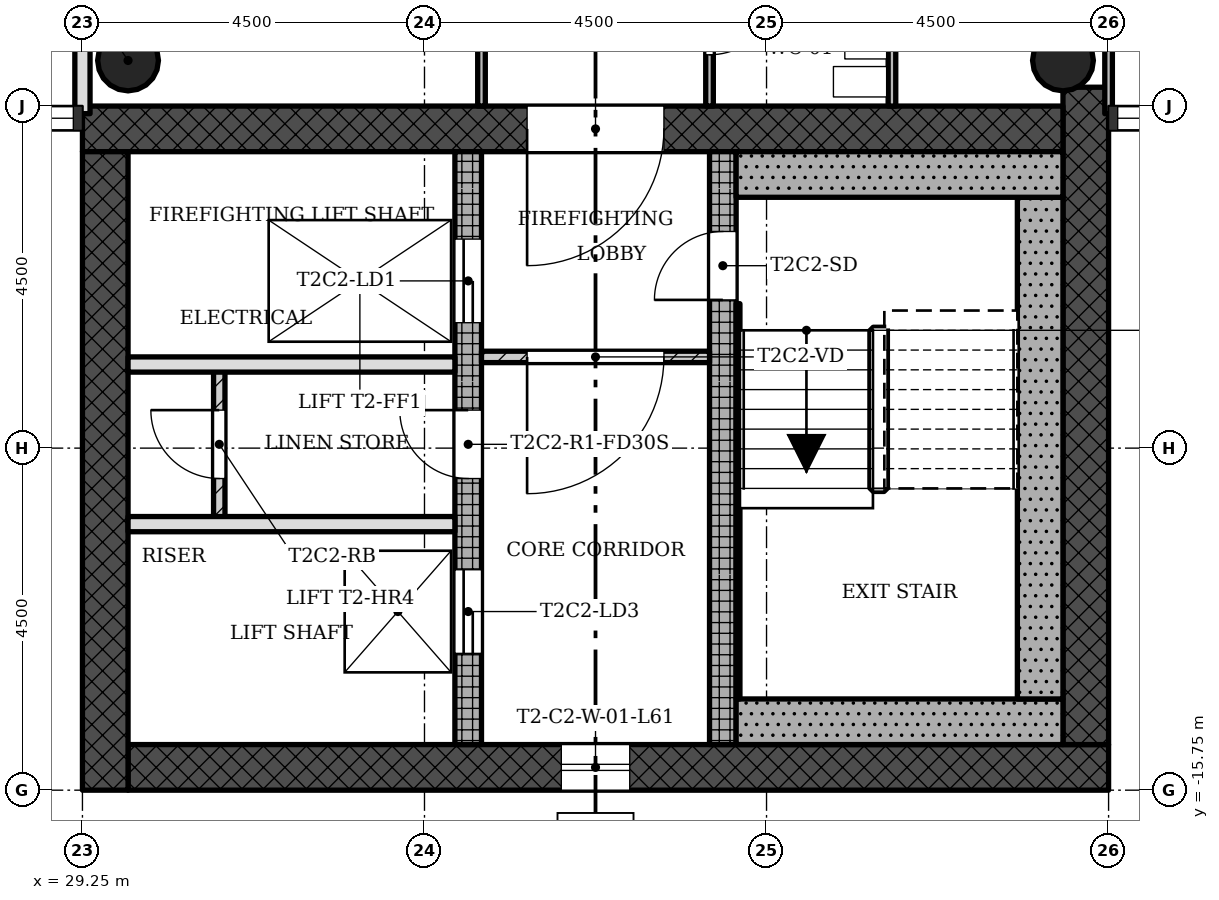
"""IFC4 building model, lengths in metres.
Left out: names, types, materials, properties, quantities, classifications, styles, units other than length and angle.
Written with IfcOpenShell. Run it as: python <this file> out.ifc"""

import sys

from ifc_helpers import new_model, si_unit, direction, frame, frame_2d, origin, origin_2d, place, context, subcontext, project, spatial, rectangle, hollow_circle, extrude, element, fill, save


model = new_model("IFC4")
c1 = context("Model", 3, precision=1e-05, world=origin(), true_north=direction((0.0, 1.0)))
c2 = subcontext(c1, "Body", "Model", "MODEL_VIEW")
j1 = project(units=[si_unit("LENGTHUNIT", "METRE"), si_unit("PLANEANGLEUNIT", "RADIAN")], contexts=[c1])
p1 = place(None, origin())
s1 = spatial("IfcSite", under=j1, at=p1, CompositionType="ELEMENT")
p2 = place(p1, origin())
s2 = spatial("IfcBuilding", under=s1, at=p2, CompositionType="ELEMENT")
p3 = place(p2, frame((0.0, 0.0, 219.8)))
s3 = spatial("IfcBuildingStorey", under=s2, at=p3, CompositionType="ELEMENT", Elevation=219.8)
p4 = place(p3, frame((29.85, -15.45, 0.0), z_axis=(0.0, 0.0, 1.0), x_axis=(1.0, 0.0, 0.0)))
e1 = element("IfcWall", 1, at=p4, inside=s3, PredefinedType="SHEAR", context=c2, shape_type="SweptSolid", body=[
    extrude(rectangle(XDim=12.9, YDim=0.6, at=frame_2d((6.45, 0.0))), origin(), (0.0, 0.0, 1.0), 3.4),
])
p5 = place(p4, frame((5.7, 0.0, 0.45)))
e2 = element("IfcOpeningElement", 2, at=p5, cuts=e1, PredefinedType="OPENING", context=c2, shape_type="SweptSolid", body=[
    extrude(rectangle(XDim=0.9, YDim=2.4, at=frame_2d((0.45, 1.2))), frame((0.0, 0.31, 0.0), z_axis=(0.0, -1.0, 0.0), x_axis=(1.0, 0.0, 0.0)), (0.0, 0.0, 1.0), 0.62),
])
p6 = place(p3, frame((42.45, -15.15, 0.0), z_axis=(0.0, 0.0, 1.0), x_axis=(0.0, 1.0, 0.0)))
e3 = element("IfcWall", 3, at=p6, inside=s3, PredefinedType="SHEAR", context=c2, shape_type="SweptSolid", body=[
    extrude(rectangle(XDim=8.648, YDim=0.6, at=frame_2d((4.324, 0.0))), origin(), (0.0, 0.0, 1.0), 3.4),
])
p7 = place(p3, frame((42.15, -7.05, 0.0), z_axis=(0.0, 0.0, 1.0), x_axis=(-1.0, 0.0, 0.0)))
e4 = element("IfcWall", 4, at=p7, inside=s3, PredefinedType="SHEAR", context=c2, shape_type="SweptSolid", body=[
    extrude(rectangle(XDim=12.9, YDim=0.6, at=frame_2d((6.45, 0.0))), origin(), (0.0, 0.0, 1.0), 3.4),
])
p8 = place(p7, frame((5.25, 0.0, 0.0)))
e5 = element("IfcOpeningElement", 5, at=p8, cuts=e4, PredefinedType="OPENING", context=c2, shape_type="SweptSolid", body=[
    extrude(rectangle(XDim=1.8, YDim=2.1, at=frame_2d((0.9, 1.05))), frame((0.0, 0.31, 0.0), z_axis=(0.0, -1.0, 0.0), x_axis=(1.0, 0.0, 0.0)), (0.0, 0.0, 1.0), 0.62),
])
p9 = place(p3, frame((29.55, -7.35, 0.0), z_axis=(0.0, 0.0, 1.0), x_axis=(0.0, -1.0, 0.0)))
e6 = element("IfcWall", 6, at=p9, inside=s3, PredefinedType="SHEAR", context=c2, shape_type="SweptSolid", body=[
    extrude(rectangle(XDim=8.4, YDim=0.6, at=frame_2d((4.2, 0.0))), origin(), (0.0, 0.0, 1.0), 3.4),
])
p10 = place(p3, frame((34.325, -15.15, 0.0), z_axis=(0.0, 0.0, 1.0), x_axis=(0.0, 1.0, 0.0)))
e7 = element("IfcWall", 7, at=p10, inside=s3, PredefinedType="SHEAR", context=c2, shape_type="SweptSolid", body=[
    extrude(rectangle(XDim=7.8, YDim=0.35, at=frame_2d((3.9, 0.0))), origin(), (0.0, 0.0, 1.0), 3.4),
])
p11 = place(p10, frame((5.55, 0.0, 0.0)))
e8 = element("IfcOpeningElement", 8, at=p11, cuts=e7, PredefinedType="OPENING", context=c2, shape_type="SweptSolid", body=[
    extrude(rectangle(XDim=1.1, YDim=2.1, at=frame_2d((0.55, 1.05))), frame((0.0, 0.185, 0.0), z_axis=(0.0, -1.0, 0.0), x_axis=(1.0, 0.0, 0.0)), (0.0, 0.0, 1.0), 0.37),
])
p12 = place(p10, frame((1.2, 0.0, 0.0)))
e9 = element("IfcOpeningElement", 9, at=p12, cuts=e7, PredefinedType="OPENING", context=c2, shape_type="SweptSolid", body=[
    extrude(rectangle(XDim=1.1, YDim=2.1, at=frame_2d((0.55, 1.05))), frame((0.0, 0.185, 0.0), z_axis=(0.0, -1.0, 0.0), x_axis=(1.0, 0.0, 0.0)), (0.0, 0.0, 1.0), 0.37),
])
p13 = place(p10, frame((3.5, 0.0, 0.0)))
e10 = element("IfcOpeningElement", 10, at=p13, cuts=e7, PredefinedType="OPENING", context=c2, shape_type="SweptSolid", body=[
    extrude(rectangle(XDim=0.9, YDim=2.1, at=frame_2d((0.45, 1.05))), frame((0.0, 0.185, 0.0), z_axis=(0.0, -1.0, 0.0), x_axis=(1.0, 0.0, 0.0)), (0.0, 0.0, 1.0), 0.37),
])
p14 = place(p3, frame((37.675, -15.15, 0.0), z_axis=(0.0, 0.0, 1.0), x_axis=(0.0, 1.0, 0.0)))
e11 = element("IfcWall", 11, at=p14, inside=s3, PredefinedType="SHEAR", context=c2, shape_type="SweptSolid", body=[
    extrude(rectangle(XDim=7.8, YDim=0.35, at=frame_2d((3.9, 0.0))), origin(), (0.0, 0.0, 1.0), 3.4),
])
p15 = place(p14, frame((5.85, 0.0, 0.0)))
e12 = element("IfcOpeningElement", 12, at=p15, cuts=e11, PredefinedType="OPENING", context=c2, shape_type="SweptSolid", body=[
    extrude(rectangle(XDim=0.9, YDim=2.1, at=frame_2d((0.45, 1.05))), frame((0.0, 0.185, 0.0), z_axis=(0.0, -1.0, 0.0), x_axis=(1.0, 0.0, 0.0)), (0.0, 0.0, 1.0), 0.37),
])
for number, where, z_axis, x_axis in (
    (13, (42.15, -6.15, 0.0), (0.0, 0.0, 1.0), (1.0, 0.0, 0.0)),
    (14, (29.85, -6.15, 0.0), (0.0, 0.0, 1.0), (1.0, 0.0, 0.0)),
):
    element("IfcColumn", number, at=place(p3, frame(where, z_axis=z_axis, x_axis=x_axis)), inside=s3, PredefinedType="COLUMN", context=c2, shape_type="SweptSolid", body=[
        extrude(hollow_circle(Radius=0.4, WallThickness=0.028, at=origin_2d()), origin(), (0.0, 0.0, 1.0), 3.4),
    ])
p16 = place(p3, frame((34.5, -10.05, 0.0), z_axis=(0.0, 0.0, 1.0), x_axis=(1.0, 0.0, 0.0)))
e15 = element("IfcWall", 15, at=p16, inside=s3, PredefinedType="PARTITIONING", context=c2, shape_type="SweptSolid", body=[
    extrude(rectangle(XDim=3.0, YDim=0.15, at=frame_2d((1.5, 0.0))), origin(), (0.0, 0.0, 1.0), 3.0),
])
p17 = place(p16, frame((0.6, 0.0, 0.0)))
e16 = element("IfcOpeningElement", 16, at=p17, cuts=e15, PredefinedType="OPENING", context=c2, shape_type="SweptSolid", body=[
    extrude(rectangle(XDim=1.8, YDim=2.1, at=frame_2d((0.9, 1.05))), frame((0.0, 0.085, 0.0), z_axis=(0.0, -1.0, 0.0), x_axis=(1.0, 0.0, 0.0)), (0.0, 0.0, 1.0), 0.17),
])
for number, where, z_axis, x_axis in (
    (17, (29.85, -12.25, 0.0), (0.0, 0.0, 1.0), (1.0, 0.0, 0.0)),
    (18, (29.85, -10.15, 0.0), (0.0, 0.0, 1.0), (1.0, 0.0, 0.0)),
):
    element("IfcWall", number, at=place(p3, frame(where, z_axis=z_axis, x_axis=x_axis)), inside=s3, PredefinedType="SOLIDWALL", context=c2, shape_type="SweptSolid", body=[
        extrude(rectangle(XDim=4.3, YDim=0.2, at=frame_2d((2.15, 0.0))), origin(), (0.0, 0.0, 1.0), 3.0),
    ])
p18 = place(p3, frame((31.05, -10.15, 0.0), z_axis=(0.0, 0.0, 1.0), x_axis=(0.0, -1.0, 0.0)))
e19 = element("IfcWall", 19, at=p18, inside=s3, PredefinedType="PARTITIONING", context=c2, shape_type="SweptSolid", body=[
    extrude(rectangle(XDim=2.1, YDim=0.15, at=frame_2d((1.05, 0.0))), origin(), (0.0, 0.0, 1.0), 3.0),
])
p19 = place(p18, frame((0.6, 0.0, 0.0)))
e20 = element("IfcOpeningElement", 20, at=p19, cuts=e19, PredefinedType="OPENING", context=c2, shape_type="SweptSolid", body=[
    extrude(rectangle(XDim=0.9, YDim=2.1, at=frame_2d((0.45, 1.05))), frame((0.0, 0.085, 0.0), z_axis=(0.0, -1.0, 0.0), x_axis=(1.0, 0.0, 0.0)), (0.0, 0.0, 1.0), 0.17),
])
p20 = place(p3, frame((42.75, -6.85, 0.0), z_axis=(0.0, 0.0, 1.0), x_axis=(0.0, 1.0, 0.0)))
e21 = element("IfcWall", 21, at=p20, inside=s3, PredefinedType="PARTITIONING", context=c2, shape_type="SweptSolid", body=[
    extrude(rectangle(XDim=5.95, YDim=0.1, at=frame_2d((2.975, 0.0))), origin(), (0.0, 0.0, 1.0), 3.0),
])
p21 = place(p3, frame((39.9, -6.75, 0.0), z_axis=(0.0, 0.0, 1.0), x_axis=(0.0, 1.0, 0.0)))
e22 = element("IfcWall", 22, at=p21, inside=s3, PredefinedType="PARTITIONING", context=c2, shape_type="SweptSolid", body=[
    extrude(rectangle(XDim=2.25, YDim=0.1, at=frame_2d((1.125, 0.0))), origin(), (0.0, 0.0, 1.0), 3.0),
])
p22 = place(p3, frame((37.5, -6.75, 0.0), z_axis=(0.0, 0.0, 1.0), x_axis=(0.0, 1.0, 0.0)))
e23 = element("IfcWall", 23, at=p22, inside=s3, PredefinedType="PARTITIONING", context=c2, shape_type="SweptSolid", body=[
    extrude(rectangle(XDim=2.25, YDim=0.1, at=frame_2d((1.125, 0.0))), origin(), (0.0, 0.0, 1.0), 3.0),
])
p23 = place(p22, frame((0.675, 0.0, 0.0)))
e24 = element("IfcOpeningElement", 24, at=p23, cuts=e23, PredefinedType="OPENING", context=c2, shape_type="SweptSolid", body=[
    extrude(rectangle(XDim=0.9, YDim=2.1, at=frame_2d((0.45, 1.05))), frame((0.0, 0.06, 0.0), z_axis=(0.0, -1.0, 0.0), x_axis=(1.0, 0.0, 0.0)), (0.0, 0.0, 1.0), 0.12),
])
p24 = place(p3, frame((34.5, -6.75, 0.0), z_axis=(0.0, 0.0, 1.0), x_axis=(0.0, 1.0, 0.0)))
e25 = element("IfcWall", 25, at=p24, inside=s3, PredefinedType="PARTITIONING", context=c2, shape_type="SweptSolid", body=[
    extrude(rectangle(XDim=2.25, YDim=0.1, at=frame_2d((1.125, 0.0))), origin(), (0.0, 0.0, 1.0), 3.0),
])
p25 = place(p3, frame((29.25, -6.85, 0.0), z_axis=(0.0, 0.0, 1.0), x_axis=(0.0, 1.0, 0.0)))
e26 = element("IfcWall", 26, at=p25, inside=s3, PredefinedType="SOLIDWALL", context=c2, shape_type="SweptSolid", body=[
    extrude(rectangle(XDim=13.7, YDim=0.2, at=frame_2d((6.85, 0.0))), origin(), (0.0, 0.0, 1.0), 3.0),
])
p26 = place(p25, frame((6.4, 0.0, 0.0)))
e27 = element("IfcOpeningElement", 27, at=p26, cuts=e26, PredefinedType="OPENING", context=c2, shape_type="SweptSolid", body=[
    extrude(rectangle(XDim=0.9, YDim=2.1, at=frame_2d((0.45, 1.05))), frame((0.0, 0.11, 0.0), z_axis=(0.0, -1.0, 0.0), x_axis=(1.0, 0.0, 0.0)), (0.0, 0.0, 1.0), 0.22),
])
p27 = place(p3, frame((37.85, -14.85, 0.0), z_axis=(0.0, 0.0, 1.0), x_axis=(1.0, 0.0, 0.0)))
e28 = element("IfcWall", 28, at=p27, inside=s3, PredefinedType="SHEAR", context=c2, shape_type="SweptSolid", body=[
    extrude(rectangle(XDim=4.3, YDim=0.6, at=frame_2d((2.15, 0.0))), origin(), (0.0, 0.0, 1.0), 3.4),
])
p28 = place(p3, frame((41.85, -7.95, 0.0), z_axis=(0.0, 0.0, 1.0), x_axis=(0.0, -1.0, 0.0)))
e29 = element("IfcWall", 29, at=p28, inside=s3, PredefinedType="SHEAR", context=c2, shape_type="SweptSolid", body=[
    extrude(rectangle(XDim=6.6, YDim=0.6, at=frame_2d((3.3, 0.0))), origin(), (0.0, 0.0, 1.0), 3.4),
])
p29 = place(p3, frame((37.85, -7.65, 0.0), z_axis=(0.0, 0.0, 1.0), x_axis=(1.0, 0.0, 0.0)))
e30 = element("IfcWall", 30, at=p29, inside=s3, PredefinedType="SHEAR", context=c2, shape_type="SweptSolid", body=[
    extrude(rectangle(XDim=4.3, YDim=0.6, at=frame_2d((2.15, 0.0))), origin(), (0.0, 0.0, 1.0), 3.4),
])
p30 = place(p3, frame((37.875, -9.35, 0.0), z_axis=(0.0, 0.0, 1.0), x_axis=(0.0, -1.0, 0.0)))
e31 = element("IfcWall", 31, at=p30, inside=s3, PredefinedType="SHEAR", context=c2, shape_type="SweptSolid", body=[
    extrude(rectangle(XDim=5.2, YDim=0.05, at=frame_2d((2.6, 0.0))), origin(), (0.0, 0.0, 1.0), 3.4),
])
p31 = place(p5, origin())
e32 = element("IfcWindow", 32, at=p31, inside=s3, PartitioningType="SINGLE_PANEL", PredefinedType="WINDOW", context=c2, shape_type="SweptSolid", body=[
    extrude(rectangle(XDim=0.9, YDim=2.4, at=frame_2d((0.45, 1.2))), frame((0.0, 0.03, 0.0), z_axis=(0.0, -1.0, 0.0), x_axis=(1.0, 0.0, 0.0)), (0.0, 0.0, 1.0), 0.06),
])
fill(e2, e32)
p32 = place(p17, origin())
e33 = element("IfcDoor", 33, at=p32, inside=s3, OperationType="SINGLE_SWING_LEFT", PredefinedType="DOOR", context=c2, shape_type="SweptSolid", body=[
    extrude(rectangle(XDim=1.8, YDim=2.1, at=frame_2d((0.9, 1.05))), frame((0.0, 0.025, 0.0), z_axis=(0.0, -1.0, 0.0), x_axis=(1.0, 0.0, 0.0)), (0.0, 0.0, 1.0), 0.05),
])
fill(e16, e33)
p33 = place(p19, origin())
e34 = element("IfcDoor", 34, at=p33, inside=s3, OperationType="SINGLE_SWING_LEFT", PredefinedType="DOOR", context=c2, shape_type="SweptSolid", body=[
    extrude(rectangle(XDim=0.9, YDim=2.1, at=frame_2d((0.45, 1.05))), frame((0.0, 0.025, 0.0), z_axis=(0.0, -1.0, 0.0), x_axis=(1.0, 0.0, 0.0)), (0.0, 0.0, 1.0), 0.05),
])
fill(e20, e34)
p34 = place(p23, origin())
e35 = element("IfcDoor", 35, at=p34, inside=s3, OperationType="SINGLE_SWING_RIGHT", PredefinedType="DOOR", context=c2, shape_type="SweptSolid", body=[
    extrude(rectangle(XDim=0.9, YDim=2.1, at=frame_2d((0.45, 1.05))), frame((0.0, 0.025, 0.0), z_axis=(0.0, -1.0, 0.0), x_axis=(1.0, 0.0, 0.0)), (0.0, 0.0, 1.0), 0.05),
])
fill(e24, e35)
p35 = place(p15, origin())
e36 = element("IfcDoor", 36, at=p35, inside=s3, OperationType="SINGLE_SWING_RIGHT", PredefinedType="DOOR", context=c2, shape_type="SweptSolid", body=[
    extrude(rectangle(XDim=0.9, YDim=2.1, at=frame_2d((0.45, 1.05))), frame((0.0, 0.025, 0.0), z_axis=(0.0, -1.0, 0.0), x_axis=(1.0, 0.0, 0.0)), (0.0, 0.0, 1.0), 0.05),
])
fill(e12, e36)
p36 = place(p11, origin())
e37 = element("IfcDoor", 37, at=p36, inside=s3, OperationType="SLIDING_TO_LEFT", PredefinedType="DOOR", context=c2, shape_type="SweptSolid", body=[
    extrude(rectangle(XDim=1.1, YDim=2.1, at=frame_2d((0.55, 1.05))), frame((0.0, 0.025, 0.0), z_axis=(0.0, -1.0, 0.0), x_axis=(1.0, 0.0, 0.0)), (0.0, 0.0, 1.0), 0.05),
])
fill(e8, e37)
p37 = place(p12, origin())
e38 = element("IfcDoor", 38, at=p37, inside=s3, OperationType="SLIDING_TO_LEFT", PredefinedType="DOOR", context=c2, shape_type="SweptSolid", body=[
    extrude(rectangle(XDim=1.1, YDim=2.1, at=frame_2d((0.55, 1.05))), frame((0.0, 0.025, 0.0), z_axis=(0.0, -1.0, 0.0), x_axis=(1.0, 0.0, 0.0)), (0.0, 0.0, 1.0), 0.05),
])
fill(e9, e38)
p38 = place(p13, origin())
e39 = element("IfcDoor", 39, at=p38, inside=s3, OperationType="SINGLE_SWING_LEFT", PredefinedType="DOOR", context=c2, shape_type="SweptSolid", body=[
    extrude(rectangle(XDim=0.9, YDim=2.1, at=frame_2d((0.45, 1.05))), frame((0.0, 0.025, 0.0), z_axis=(0.0, -1.0, 0.0), x_axis=(1.0, 0.0, 0.0)), (0.0, 0.0, 1.0), 0.05),
])
fill(e10, e39)
p39 = place(p8, origin())
e40 = element("IfcDoor", 40, at=p39, inside=s3, OperationType="SINGLE_SWING_LEFT", PredefinedType="DOOR", context=c2, shape_type="SweptSolid", body=[
    extrude(rectangle(XDim=1.8, YDim=2.1, at=frame_2d((0.9, 1.05))), frame((0.0, 0.025, 0.0), z_axis=(0.0, -1.0, 0.0), x_axis=(1.0, 0.0, 0.0)), (0.0, 0.0, 1.0), 0.05),
])
fill(e5, e40)
save(model, sys.argv[1])
